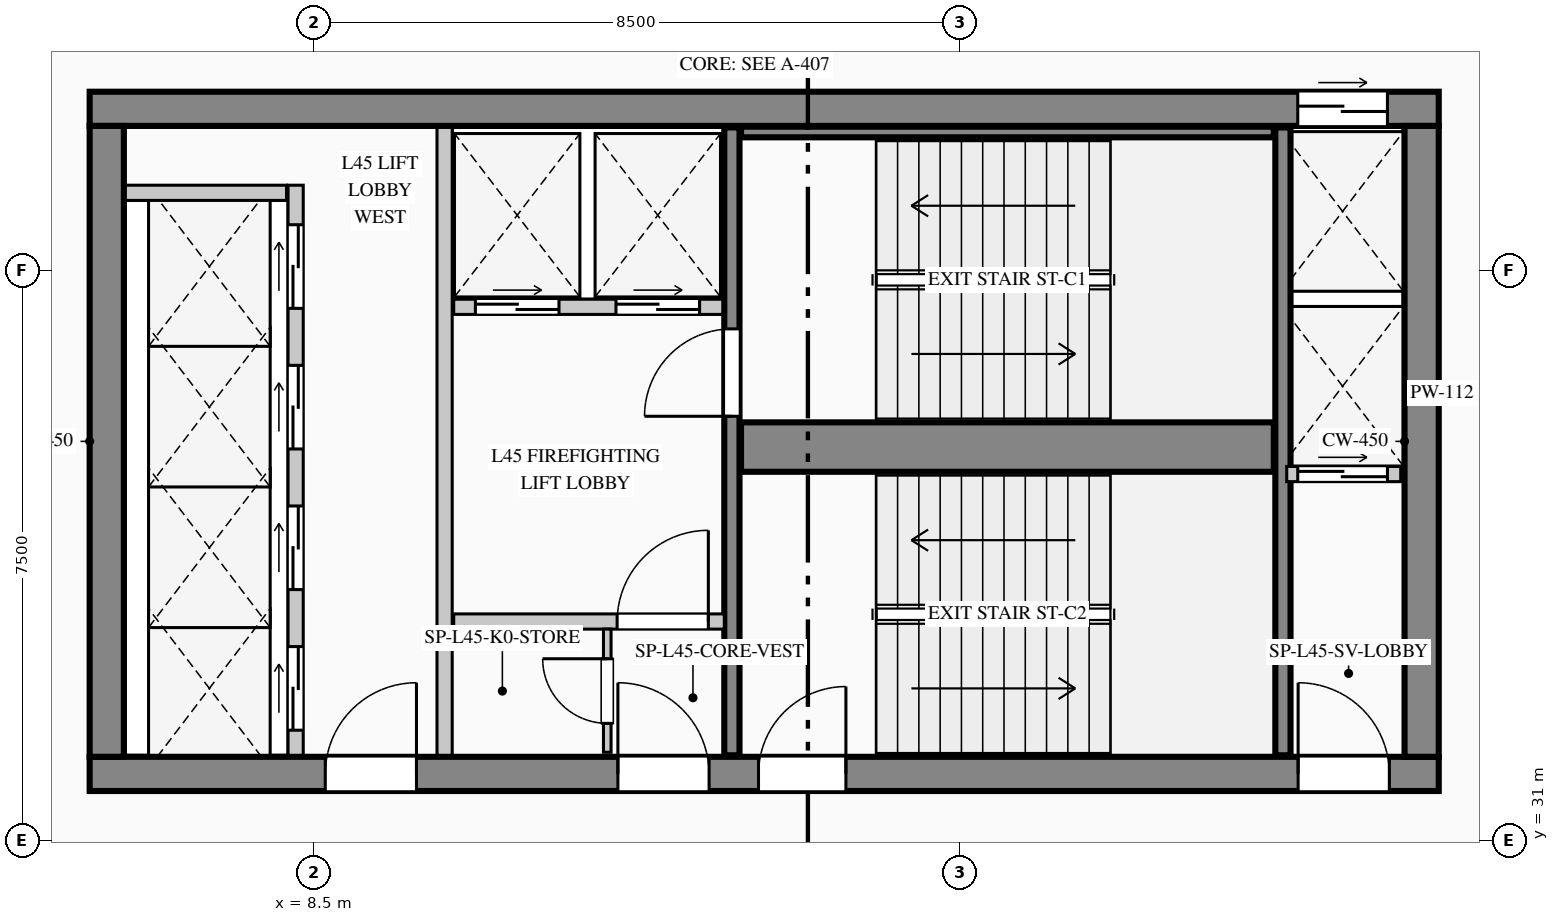
"""IFC4 building model, lengths in metres.
Left out: names, types, materials, properties, quantities, classifications, styles, units other than length and angle.
Written with IfcOpenShell. Run it as: python <this file> out.ifc"""

import sys

from ifc_helpers import new_model, si_unit, direction, frame, frame_2d, origin, place, context, subcontext, project, spatial, rectangle, extrude, element, fill, save


model = new_model("IFC4")
c1 = context("Model", 3, precision=1e-05, world=origin(), true_north=direction((0.0, 1.0)))
c2 = subcontext(c1, "Body", "Model", "MODEL_VIEW")
j1 = project(units=[si_unit("LENGTHUNIT", "METRE"), si_unit("PLANEANGLEUNIT", "RADIAN")], contexts=[c1])
p1 = place(None, origin())
s1 = spatial("IfcSite", under=j1, at=p1, CompositionType="ELEMENT")
p2 = place(p1, origin())
s2 = spatial("IfcBuilding", under=s1, at=p2, CompositionType="ELEMENT")
p3 = place(p2, frame((0.0, 0.0, 191.65)))
s3 = spatial("IfcBuildingStorey", under=s2, at=p3, CompositionType="ELEMENT", Elevation=191.65)
p4 = place(p3, frame((5.55, 40.625, 0.0), z_axis=(0.0, 0.0, 1.0), x_axis=(1.0, 0.0, 0.0)))
e1 = element("IfcWall", 1, at=p4, inside=s3, PredefinedType="SHEAR", context=c2, shape_type="SweptSolid", body=[
    extrude(rectangle(XDim=17.75, YDim=0.45, at=frame_2d((8.875, 0.0))), origin(), (0.0, 0.0, 1.0), 3.95),
])
p5 = place(p4, frame((15.895, 0.0, 0.0)))
e2 = element("IfcOpeningElement", 2, at=p5, cuts=e1, PredefinedType="OPENING", context=c2, shape_type="SweptSolid", body=[
    extrude(rectangle(XDim=1.18, YDim=2.25, at=frame_2d((0.59, 1.125))), frame((0.0, 0.235, 0.0), z_axis=(0.0, -1.0, 0.0), x_axis=(1.0, 0.0, 0.0)), (0.0, 0.0, 1.0), 0.47),
])
p6 = place(p3, frame((5.55, 31.875, 0.0), z_axis=(0.0, 0.0, 1.0), x_axis=(1.0, 0.0, 0.0)))
e3 = element("IfcWall", 3, at=p6, inside=s3, PredefinedType="SHEAR", context=c2, shape_type="SweptSolid", body=[
    extrude(rectangle(XDim=17.75, YDim=0.45, at=frame_2d((8.875, 0.0))), origin(), (0.0, 0.0, 1.0), 3.95),
])
p7 = place(p6, frame((3.1, 0.0, 0.0)))
e4 = element("IfcOpeningElement", 4, at=p7, cuts=e3, PredefinedType="OPENING", context=c2, shape_type="SweptSolid", body=[
    extrude(rectangle(XDim=1.2, YDim=2.2, at=frame_2d((0.6, 1.1))), frame((0.0, 0.235, 0.0), z_axis=(0.0, -1.0, 0.0), x_axis=(1.0, 0.0, 0.0)), (0.0, 0.0, 1.0), 0.47),
])
p8 = place(p6, frame((6.95, 0.0, 0.0)))
e5 = element("IfcOpeningElement", 5, at=p8, cuts=e3, PredefinedType="OPENING", context=c2, shape_type="SweptSolid", body=[
    extrude(rectangle(XDim=1.2, YDim=2.2, at=frame_2d((0.6, 1.1))), frame((0.0, 0.235, 0.0), z_axis=(0.0, -1.0, 0.0), x_axis=(1.0, 0.0, 0.0)), (0.0, 0.0, 1.0), 0.47),
])
p9 = place(p6, frame((8.8, 0.0, 0.0)))
e6 = element("IfcOpeningElement", 6, at=p9, cuts=e3, PredefinedType="OPENING", context=c2, shape_type="SweptSolid", body=[
    extrude(rectangle(XDim=1.15, YDim=2.2, at=frame_2d((0.575, 1.1))), frame((0.0, 0.235, 0.0), z_axis=(0.0, -1.0, 0.0), x_axis=(1.0, 0.0, 0.0)), (0.0, 0.0, 1.0), 0.47),
])
p10 = place(p6, frame((15.9, 0.0, 0.0)))
e7 = element("IfcOpeningElement", 7, at=p10, cuts=e3, PredefinedType="OPENING", context=c2, shape_type="SweptSolid", body=[
    extrude(rectangle(XDim=1.2, YDim=2.2, at=frame_2d((0.6, 1.1))), frame((0.0, 0.235, 0.0), z_axis=(0.0, -1.0, 0.0), x_axis=(1.0, 0.0, 0.0)), (0.0, 0.0, 1.0), 0.47),
])
for number, where, z_axis, x_axis in (
    (8, (5.775, 32.1, 0.0), (0.0, 0.0, 1.0), (0.0, 1.0, 0.0)),
    (9, (23.075, 32.1, 0.0), (0.0, 0.0, 1.0), (0.0, 1.0, 0.0)),
):
    element("IfcWall", number, at=place(p3, frame(where, z_axis=z_axis, x_axis=x_axis)), inside=s3, PredefinedType="SHEAR", context=c2, shape_type="SweptSolid", body=[
        extrude(rectangle(XDim=8.3, YDim=0.45, at=frame_2d((4.15, 0.0))), origin(), (0.0, 0.0, 1.0), 3.95),
    ])
p11 = place(p3, frame((14.0, 32.12, 0.0), z_axis=(0.0, 0.0, 1.0), x_axis=(0.0, 1.0, 0.0)))
e10 = element("IfcWall", 10, at=p11, inside=s3, PredefinedType="SHEAR", context=c2, shape_type="SweptSolid", body=[
    extrude(rectangle(XDim=8.26, YDim=0.2, at=frame_2d((4.13, 0.0))), origin(), (0.0, 0.0, 1.0), 3.95),
])
p12 = place(p11, frame((4.46, 0.0, 0.0)))
e11 = element("IfcOpeningElement", 11, at=p12, cuts=e10, PredefinedType="OPENING", context=c2, shape_type="SweptSolid", body=[
    extrude(rectangle(XDim=1.15, YDim=2.2, at=frame_2d((0.575, 1.1))), frame((0.0, 0.11, 0.0), z_axis=(0.0, -1.0, 0.0), x_axis=(1.0, 0.0, 0.0)), (0.0, 0.0, 1.0), 0.22),
])
p13 = place(p3, frame((14.12, 36.175, 0.0), z_axis=(0.0, 0.0, 1.0), x_axis=(1.0, 0.0, 0.0)))
e12 = element("IfcWall", 12, at=p13, inside=s3, PredefinedType="SHEAR", context=c2, shape_type="SweptSolid", body=[
    extrude(rectangle(XDim=7.01, YDim=0.65, at=frame_2d((3.505, 0.0))), origin(), (0.0, 0.0, 1.0), 3.95),
])
p14 = place(p3, frame((21.25, 32.12, 0.0), z_axis=(0.0, 0.0, 1.0), x_axis=(0.0, 1.0, 0.0)))
e13 = element("IfcWall", 13, at=p14, inside=s3, PredefinedType="SHEAR", context=c2, shape_type="SweptSolid", body=[
    extrude(rectangle(XDim=8.26, YDim=0.2, at=frame_2d((4.13, 0.0))), origin(), (0.0, 0.0, 1.0), 3.95),
])
p15 = place(p3, frame((14.12, 40.32, 0.0), z_axis=(0.0, 0.0, 1.0), x_axis=(1.0, 0.0, 0.0)))
e14 = element("IfcWall", 14, at=p15, inside=s3, PredefinedType="SHEAR", context=c2, shape_type="SweptSolid", body=[
    extrude(rectangle(XDim=7.01, YDim=0.14, at=frame_2d((3.505, 0.0))), origin(), (0.0, 0.0, 1.0), 3.95),
])
p16 = place(p3, frame((7.469, 4.63, 0.0), z_axis=(0.0, 0.0, 1.0), x_axis=(-0.123515300309, 0.992342667928, 0.0)))
e15 = element("IfcWall", 15, at=p16, inside=s3, PredefinedType="STANDARD", context=c2, shape_type="SweptSolid", body=[
    extrude(rectangle(XDim=37.024, YDim=0.26, at=frame_2d((18.512, 0.0))), origin(), (0.0, 0.0, 1.0), 3.7),
])
p17 = place(p16, frame((11.978, 0.0, 0.9)))
e16 = element("IfcOpeningElement", 16, at=p17, cuts=e15, PredefinedType="OPENING", context=c2, shape_type="SweptSolid", body=[
    extrude(rectangle(XDim=2.7, YDim=2.1, at=frame_2d((1.35, 1.05))), frame((0.0, 0.14, 0.0), z_axis=(0.0, -1.0, 0.0), x_axis=(1.0, 0.0, 0.0)), (0.0, 0.0, 1.0), 0.28),
])
p18 = place(p3, frame((8.26, 32.12, 0.0), z_axis=(0.0, 0.0, 1.0), x_axis=(0.0, 1.0, 0.0)))
e17 = element("IfcWall", 17, at=p18, inside=s3, PredefinedType="PARTITIONING", context=c2, shape_type="SweptSolid", body=[
    extrude(rectangle(XDim=7.5, YDim=0.2, at=frame_2d((3.75, 0.0))), origin(), (0.0, 0.0, 1.0), 3.7),
])
p19 = place(p18, frame((0.33, 0.0, 0.0)))
e18 = element("IfcOpeningElement", 18, at=p19, cuts=e17, PredefinedType="OPENING", context=c2, shape_type="SweptSolid", body=[
    extrude(rectangle(XDim=1.1, YDim=2.2, at=frame_2d((0.55, 1.1))), frame((0.0, 0.11, 0.0), z_axis=(0.0, -1.0, 0.0), x_axis=(1.0, 0.0, 0.0)), (0.0, 0.0, 1.0), 0.22),
])
p20 = place(p18, frame((2.18, 0.0, 0.0)))
e19 = element("IfcOpeningElement", 19, at=p20, cuts=e17, PredefinedType="OPENING", context=c2, shape_type="SweptSolid", body=[
    extrude(rectangle(XDim=1.1, YDim=2.2, at=frame_2d((0.55, 1.1))), frame((0.0, 0.11, 0.0), z_axis=(0.0, -1.0, 0.0), x_axis=(1.0, 0.0, 0.0)), (0.0, 0.0, 1.0), 0.22),
])
p21 = place(p18, frame((4.03, 0.0, 0.0)))
e20 = element("IfcOpeningElement", 20, at=p21, cuts=e17, PredefinedType="OPENING", context=c2, shape_type="SweptSolid", body=[
    extrude(rectangle(XDim=1.1, YDim=2.2, at=frame_2d((0.55, 1.1))), frame((0.0, 0.11, 0.0), z_axis=(0.0, -1.0, 0.0), x_axis=(1.0, 0.0, 0.0)), (0.0, 0.0, 1.0), 0.22),
])
p22 = place(p18, frame((5.88, 0.0, 0.0)))
e21 = element("IfcOpeningElement", 21, at=p22, cuts=e17, PredefinedType="OPENING", context=c2, shape_type="SweptSolid", body=[
    extrude(rectangle(XDim=1.1, YDim=2.2, at=frame_2d((0.55, 1.1))), frame((0.0, 0.11, 0.0), z_axis=(0.0, -1.0, 0.0), x_axis=(1.0, 0.0, 0.0)), (0.0, 0.0, 1.0), 0.22),
])
p23 = place(p3, frame((6.02, 39.52, 0.0), z_axis=(0.0, 0.0, 1.0), x_axis=(1.0, 0.0, 0.0)))
e22 = element("IfcWall", 22, at=p23, inside=s3, PredefinedType="PARTITIONING", context=c2, shape_type="SweptSolid", body=[
    extrude(rectangle(XDim=2.12, YDim=0.2, at=frame_2d((1.06, 0.0))), origin(), (0.0, 0.0, 1.0), 3.7),
])
p24 = place(p3, frame((10.22, 32.12, 0.0), z_axis=(0.0, 0.0, 1.0), x_axis=(0.0, 1.0, 0.0)))
e23 = element("IfcWall", 23, at=p24, inside=s3, PredefinedType="PARTITIONING", context=c2, shape_type="SweptSolid", body=[
    extrude(rectangle(XDim=8.26, YDim=0.2, at=frame_2d((4.13, 0.0))), origin(), (0.0, 0.0, 1.0), 3.7),
])
p25 = place(p3, frame((10.34, 38.02, 0.0), z_axis=(0.0, 0.0, 1.0), x_axis=(1.0, 0.0, 0.0)))
e24 = element("IfcWall", 24, at=p25, inside=s3, PredefinedType="PARTITIONING", context=c2, shape_type="SweptSolid", body=[
    extrude(rectangle(XDim=3.54, YDim=0.2, at=frame_2d((1.77, 0.0))), origin(), (0.0, 0.0, 1.0), 3.7),
])
p26 = place(p25, frame((0.285, 0.0, 0.0)))
e25 = element("IfcOpeningElement", 25, at=p26, cuts=e24, PredefinedType="OPENING", context=c2, shape_type="SweptSolid", body=[
    extrude(rectangle(XDim=1.1, YDim=2.2, at=frame_2d((0.55, 1.1))), frame((0.0, 0.11, 0.0), z_axis=(0.0, -1.0, 0.0), x_axis=(1.0, 0.0, 0.0)), (0.0, 0.0, 1.0), 0.22),
])
p27 = place(p25, frame((2.135, 0.0, 0.0)))
e26 = element("IfcOpeningElement", 26, at=p27, cuts=e24, PredefinedType="OPENING", context=c2, shape_type="SweptSolid", body=[
    extrude(rectangle(XDim=1.1, YDim=2.2, at=frame_2d((0.55, 1.1))), frame((0.0, 0.11, 0.0), z_axis=(0.0, -1.0, 0.0), x_axis=(1.0, 0.0, 0.0)), (0.0, 0.0, 1.0), 0.22),
])
p28 = place(p3, frame((10.34, 33.88, 0.0), z_axis=(0.0, 0.0, 1.0), x_axis=(1.0, 0.0, 0.0)))
e27 = element("IfcWall", 27, at=p28, inside=s3, PredefinedType="PARTITIONING", context=c2, shape_type="SweptSolid", body=[
    extrude(rectangle(XDim=3.56, YDim=0.2, at=frame_2d((1.78, 0.0))), origin(), (0.0, 0.0, 1.0), 3.7),
])
p29 = place(p28, frame((2.15, 0.0, 0.0)))
e28 = element("IfcOpeningElement", 28, at=p29, cuts=e27, PredefinedType="OPENING", context=c2, shape_type="SweptSolid", body=[
    extrude(rectangle(XDim=1.2, YDim=2.2, at=frame_2d((0.6, 1.1))), frame((0.0, 0.11, 0.0), z_axis=(0.0, -1.0, 0.0), x_axis=(1.0, 0.0, 0.0)), (0.0, 0.0, 1.0), 0.22),
])
p30 = place(p3, frame((12.36, 32.16, 0.0), z_axis=(0.0, 0.0, 1.0), x_axis=(0.0, 1.0, 0.0)))
e29 = element("IfcWall", 29, at=p30, inside=s3, PredefinedType="PARTITIONING", context=c2, shape_type="SweptSolid", body=[
    extrude(rectangle(XDim=1.62, YDim=0.1, at=frame_2d((0.81, 0.0))), origin(), (0.0, 0.0, 1.0), 3.7),
])
p31 = place(p30, frame((0.38, 0.0, 0.0)))
e30 = element("IfcOpeningElement", 30, at=p31, cuts=e29, PredefinedType="OPENING", context=c2, shape_type="SweptSolid", body=[
    extrude(rectangle(XDim=0.85, YDim=2.1, at=frame_2d((0.425, 1.05))), frame((0.0, 0.06, 0.0), z_axis=(0.0, -1.0, 0.0), x_axis=(1.0, 0.0, 0.0)), (0.0, 0.0, 1.0), 0.12),
])
p32 = place(p3, frame((21.3, 35.82, 0.0), z_axis=(0.0, 0.0, 1.0), x_axis=(1.0, 0.0, 0.0)))
e31 = element("IfcWall", 31, at=p32, inside=s3, PredefinedType="PARTITIONING", context=c2, shape_type="SweptSolid", body=[
    extrude(rectangle(XDim=1.5, YDim=0.2, at=frame_2d((0.75, 0.0))), origin(), (0.0, 0.0, 1.0), 3.7),
])
p33 = place(p32, frame((0.145, 0.0, 0.0)))
e32 = element("IfcOpeningElement", 32, at=p33, cuts=e31, PredefinedType="OPENING", context=c2, shape_type="SweptSolid", body=[
    extrude(rectangle(XDim=1.18, YDim=2.25, at=frame_2d((0.59, 1.125))), frame((0.0, 0.11, 0.0), z_axis=(0.0, -1.0, 0.0), x_axis=(1.0, 0.0, 0.0)), (0.0, 0.0, 1.0), 0.22),
])
p34 = place(p7, origin())
e33 = element("IfcDoor", 33, at=p34, inside=s3, OperationType="SINGLE_SWING_RIGHT", PredefinedType="DOOR", context=c2, shape_type="SweptSolid", body=[
    extrude(rectangle(XDim=1.2, YDim=2.2, at=frame_2d((0.6, 1.1))), frame((0.0, 0.025, 0.0), z_axis=(0.0, -1.0, 0.0), x_axis=(1.0, 0.0, 0.0)), (0.0, 0.0, 1.0), 0.05),
])
fill(e4, e33)
p35 = place(p8, origin())
e34 = element("IfcDoor", 34, at=p35, inside=s3, OperationType="SINGLE_SWING_LEFT", PredefinedType="DOOR", context=c2, shape_type="SweptSolid", body=[
    extrude(rectangle(XDim=1.2, YDim=2.2, at=frame_2d((0.6, 1.1))), frame((0.0, 0.025, 0.0), z_axis=(0.0, -1.0, 0.0), x_axis=(1.0, 0.0, 0.0)), (0.0, 0.0, 1.0), 0.05),
])
fill(e5, e34)
p36 = place(p9, origin())
e35 = element("IfcDoor", 35, at=p36, inside=s3, OperationType="SINGLE_SWING_RIGHT", PredefinedType="DOOR", context=c2, shape_type="SweptSolid", body=[
    extrude(rectangle(XDim=1.15, YDim=2.2, at=frame_2d((0.575, 1.1))), frame((0.0, 0.025, 0.0), z_axis=(0.0, -1.0, 0.0), x_axis=(1.0, 0.0, 0.0)), (0.0, 0.0, 1.0), 0.05),
])
fill(e6, e35)
p37 = place(p10, origin())
e36 = element("IfcDoor", 36, at=p37, inside=s3, OperationType="SINGLE_SWING_LEFT", PredefinedType="DOOR", context=c2, shape_type="SweptSolid", body=[
    extrude(rectangle(XDim=1.2, YDim=2.2, at=frame_2d((0.6, 1.1))), frame((0.0, 0.025, 0.0), z_axis=(0.0, -1.0, 0.0), x_axis=(1.0, 0.0, 0.0)), (0.0, 0.0, 1.0), 0.05),
])
fill(e7, e36)
p38 = place(p29, origin())
e37 = element("IfcDoor", 37, at=p38, inside=s3, OperationType="SINGLE_SWING_RIGHT", PredefinedType="DOOR", context=c2, shape_type="SweptSolid", body=[
    extrude(rectangle(XDim=1.2, YDim=2.2, at=frame_2d((0.6, 1.1))), frame((0.0, 0.025, 0.0), z_axis=(0.0, -1.0, 0.0), x_axis=(1.0, 0.0, 0.0)), (0.0, 0.0, 1.0), 0.05),
])
fill(e28, e37)
p39 = place(p31, origin())
e38 = element("IfcDoor", 38, at=p39, inside=s3, OperationType="SINGLE_SWING_RIGHT", PredefinedType="DOOR", context=c2, shape_type="SweptSolid", body=[
    extrude(rectangle(XDim=0.85, YDim=2.1, at=frame_2d((0.425, 1.05))), frame((0.0, 0.025, 0.0), z_axis=(0.0, -1.0, 0.0), x_axis=(1.0, 0.0, 0.0)), (0.0, 0.0, 1.0), 0.05),
])
fill(e30, e38)
p40 = place(p12, origin())
e39 = element("IfcDoor", 39, at=p40, inside=s3, OperationType="SINGLE_SWING_LEFT", PredefinedType="DOOR", context=c2, shape_type="SweptSolid", body=[
    extrude(rectangle(XDim=1.15, YDim=2.2, at=frame_2d((0.575, 1.1))), frame((0.0, 0.025, 0.0), z_axis=(0.0, -1.0, 0.0), x_axis=(1.0, 0.0, 0.0)), (0.0, 0.0, 1.0), 0.05),
])
fill(e11, e39)
p41 = place(p19, origin())
e40 = element("IfcDoor", 40, at=p41, inside=s3, OperationType="DOUBLE_DOOR_SLIDING", PredefinedType="DOOR", context=c2, shape_type="SweptSolid", body=[
    extrude(rectangle(XDim=1.1, YDim=2.2, at=frame_2d((0.55, 1.1))), frame((0.0, 0.025, 0.0), z_axis=(0.0, -1.0, 0.0), x_axis=(1.0, 0.0, 0.0)), (0.0, 0.0, 1.0), 0.05),
])
fill(e18, e40)
p42 = place(p20, origin())
e41 = element("IfcDoor", 41, at=p42, inside=s3, OperationType="DOUBLE_DOOR_SLIDING", PredefinedType="DOOR", context=c2, shape_type="SweptSolid", body=[
    extrude(rectangle(XDim=1.1, YDim=2.2, at=frame_2d((0.55, 1.1))), frame((0.0, 0.025, 0.0), z_axis=(0.0, -1.0, 0.0), x_axis=(1.0, 0.0, 0.0)), (0.0, 0.0, 1.0), 0.05),
])
fill(e19, e41)
p43 = place(p21, origin())
e42 = element("IfcDoor", 42, at=p43, inside=s3, OperationType="DOUBLE_DOOR_SLIDING", PredefinedType="DOOR", context=c2, shape_type="SweptSolid", body=[
    extrude(rectangle(XDim=1.1, YDim=2.2, at=frame_2d((0.55, 1.1))), frame((0.0, 0.025, 0.0), z_axis=(0.0, -1.0, 0.0), x_axis=(1.0, 0.0, 0.0)), (0.0, 0.0, 1.0), 0.05),
])
fill(e20, e42)
p44 = place(p22, origin())
e43 = element("IfcDoor", 43, at=p44, inside=s3, OperationType="DOUBLE_DOOR_SLIDING", PredefinedType="DOOR", context=c2, shape_type="SweptSolid", body=[
    extrude(rectangle(XDim=1.1, YDim=2.2, at=frame_2d((0.55, 1.1))), frame((0.0, 0.025, 0.0), z_axis=(0.0, -1.0, 0.0), x_axis=(1.0, 0.0, 0.0)), (0.0, 0.0, 1.0), 0.05),
])
fill(e21, e43)
p45 = place(p26, origin())
e44 = element("IfcDoor", 44, at=p45, inside=s3, OperationType="DOUBLE_DOOR_SLIDING", PredefinedType="DOOR", context=c2, shape_type="SweptSolid", body=[
    extrude(rectangle(XDim=1.1, YDim=2.2, at=frame_2d((0.55, 1.1))), frame((0.0, 0.025, 0.0), z_axis=(0.0, -1.0, 0.0), x_axis=(1.0, 0.0, 0.0)), (0.0, 0.0, 1.0), 0.05),
])
fill(e25, e44)
p46 = place(p27, origin())
e45 = element("IfcDoor", 45, at=p46, inside=s3, OperationType="DOUBLE_DOOR_SLIDING", PredefinedType="DOOR", context=c2, shape_type="SweptSolid", body=[
    extrude(rectangle(XDim=1.1, YDim=2.2, at=frame_2d((0.55, 1.1))), frame((0.0, 0.025, 0.0), z_axis=(0.0, -1.0, 0.0), x_axis=(1.0, 0.0, 0.0)), (0.0, 0.0, 1.0), 0.05),
])
fill(e26, e45)
p47 = place(p5, origin())
e46 = element("IfcDoor", 46, at=p47, inside=s3, OperationType="DOUBLE_DOOR_SLIDING", PredefinedType="DOOR", context=c2, shape_type="SweptSolid", body=[
    extrude(rectangle(XDim=1.18, YDim=2.25, at=frame_2d((0.59, 1.125))), frame((0.0, 0.025, 0.0), z_axis=(0.0, -1.0, 0.0), x_axis=(1.0, 0.0, 0.0)), (0.0, 0.0, 1.0), 0.05),
])
fill(e2, e46)
p48 = place(p33, origin())
e47 = element("IfcDoor", 47, at=p48, inside=s3, OperationType="DOUBLE_DOOR_SLIDING", PredefinedType="DOOR", context=c2, shape_type="SweptSolid", body=[
    extrude(rectangle(XDim=1.18, YDim=2.25, at=frame_2d((0.59, 1.125))), frame((0.0, 0.025, 0.0), z_axis=(0.0, -1.0, 0.0), x_axis=(1.0, 0.0, 0.0)), (0.0, 0.0, 1.0), 0.05),
])
fill(e32, e47)
save(model, sys.argv[1])
